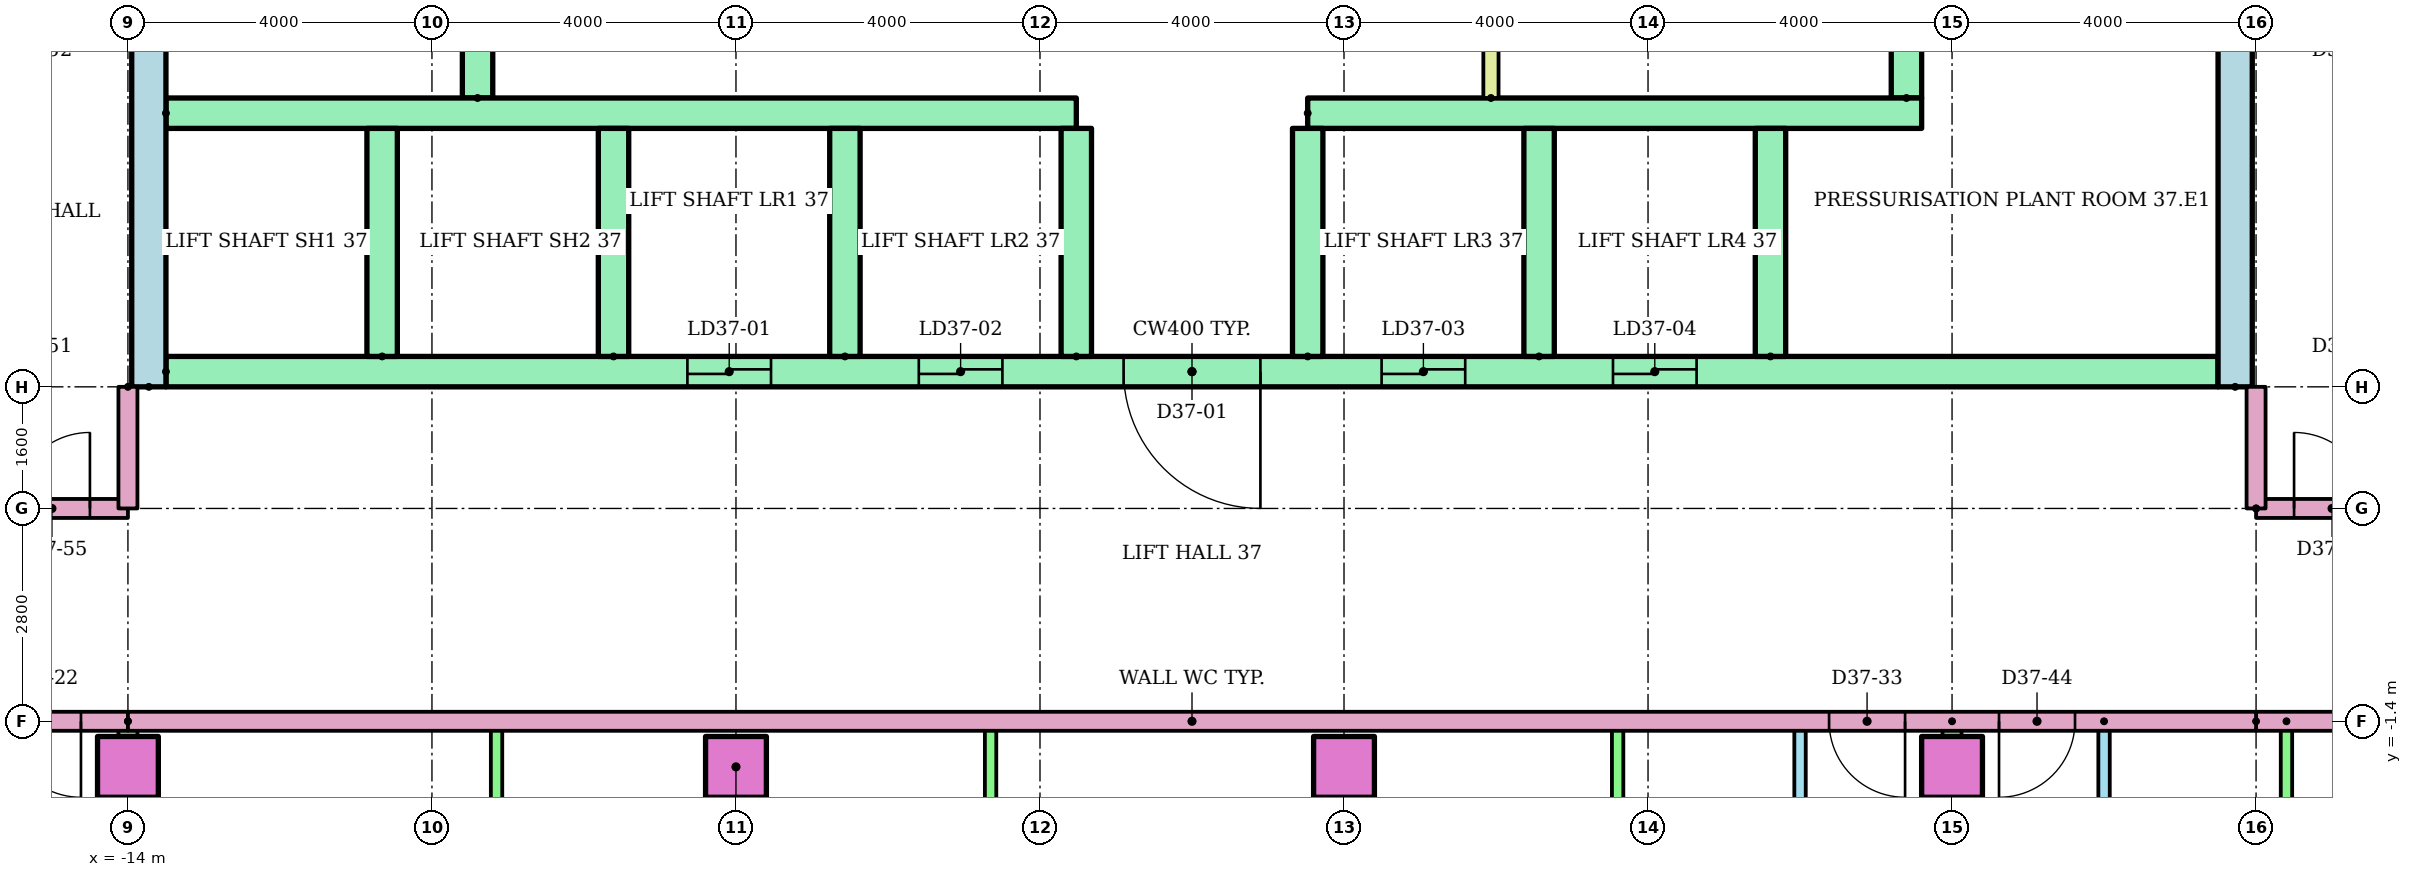
"""IFC4 building model, lengths in metres.
Left out: names, types, materials, properties, quantities, classifications, styles, units other than length and angle.
Written with IfcOpenShell. Run it as: python <this file> out.ifc"""

import sys

from ifc_helpers import new_model, si_unit, direction, frame, frame_2d, origin, origin_2d, place, context, subcontext, project, spatial, rectangle, extrude, element, fill, save


model = new_model("IFC4")
c1 = context("Model", 3, precision=1e-05, world=origin(), true_north=direction((0.0, 1.0)))
c2 = subcontext(c1, "Body", "Model", "MODEL_VIEW")
j1 = project(units=[si_unit("LENGTHUNIT", "METRE"), si_unit("PLANEANGLEUNIT", "RADIAN")], contexts=[c1])
p1 = place(None, origin())
s1 = spatial("IfcSite", under=j1, at=p1, CompositionType="ELEMENT")
p2 = place(p1, origin())
s2 = spatial("IfcBuilding", under=s1, at=p2, CompositionType="ELEMENT")
p3 = place(p2, frame((0.0, 0.0, 142.2)))
s3 = spatial("IfcBuildingStorey", under=s2, at=p3, CompositionType="ELEMENT", Elevation=142.2)
for number, where in (
    (1, (-14.0, -2.0, 0.0)),
    (2, (-6.0, -2.0, 0.0)),
    (3, (2.0, -2.0, 0.0)),
    (4, (10.0, -2.0, 0.0)),
):
    element("IfcColumn", number, at=place(p3, frame(where)), inside=s3, PredefinedType="COLUMN", context=c2, shape_type="SweptSolid", body=[
        extrude(rectangle(XDim=0.8, YDim=0.8, at=origin_2d()), origin(), (0.0, 0.0, 1.0), 3.2),
    ])
for number, where, z_axis, x_axis in (
    (5, (-13.725, 3.0, 0.0), (0.0, 0.0, 1.0), (0.0, 1.0, 0.0)),
    (6, (13.725, 3.0, 0.0), (0.0, 0.0, 1.0), (0.0, 1.0, 0.0)),
):
    element("IfcWall", number, at=place(p3, frame(where, z_axis=z_axis, x_axis=x_axis)), inside=s3, PredefinedType="SHEAR", context=c2, shape_type="SweptSolid", body=[
        extrude(rectangle(XDim=17.0, YDim=0.45, at=frame_2d((8.5, 0.0))), origin(), (0.0, 0.0, 1.0), 2.92),
    ])
p4 = place(p3, frame((-9.4, 6.8, 0.0), z_axis=(0.0, 0.0, 1.0), x_axis=(0.0, 1.0, 0.0)))
e7 = element("IfcWall", 7, at=p4, inside=s3, PredefinedType="SHEAR", context=c2, shape_type="SweptSolid", body=[
    extrude(rectangle(XDim=12.7, YDim=0.4, at=frame_2d((6.35, 0.0))), origin(), (0.0, 0.0, 1.0), 2.92),
])
p5 = place(p4, frame((1.15, 0.0, 0.0)))
e8 = element("IfcOpeningElement", 8, at=p5, cuts=e7, PredefinedType="OPENING", context=c2, shape_type="SweptSolid", body=[
    extrude(rectangle(XDim=1.0, YDim=2.1, at=frame_2d((0.5, 1.05))), frame((0.0, 0.21, 0.0), z_axis=(0.0, -1.0, 0.0), x_axis=(1.0, 0.0, 0.0)), (0.0, 0.0, 1.0), 0.42),
])
p6 = place(p4, frame((7.925, 0.0, 0.0)))
e9 = element("IfcOpeningElement", 9, at=p6, cuts=e7, PredefinedType="OPENING", context=c2, shape_type="SweptSolid", body=[
    extrude(rectangle(XDim=1.0, YDim=2.1, at=frame_2d((0.5, 1.05))), frame((0.0, 0.21, 0.0), z_axis=(0.0, -1.0, 0.0), x_axis=(1.0, 0.0, 0.0)), (0.0, 0.0, 1.0), 0.42),
])
p7 = place(p3, frame((9.4, 6.8, 0.0), z_axis=(0.0, 0.0, 1.0), x_axis=(0.0, 1.0, 0.0)))
e10 = element("IfcWall", 10, at=p7, inside=s3, PredefinedType="SHEAR", context=c2, shape_type="SweptSolid", body=[
    extrude(rectangle(XDim=12.7, YDim=0.4, at=frame_2d((6.35, 0.0))), origin(), (0.0, 0.0, 1.0), 2.92),
])
p8 = place(p7, frame((1.15, 0.0, 0.0)))
e11 = element("IfcOpeningElement", 11, at=p8, cuts=e10, PredefinedType="OPENING", context=c2, shape_type="SweptSolid", body=[
    extrude(rectangle(XDim=1.0, YDim=2.1, at=frame_2d((0.5, 1.05))), frame((0.0, 0.21, 0.0), z_axis=(0.0, -1.0, 0.0), x_axis=(1.0, 0.0, 0.0)), (0.0, 0.0, 1.0), 0.42),
])
p9 = place(p7, frame((7.925, 0.0, 0.0)))
e12 = element("IfcOpeningElement", 12, at=p9, cuts=e10, PredefinedType="OPENING", context=c2, shape_type="SweptSolid", body=[
    extrude(rectangle(XDim=1.0, YDim=2.1, at=frame_2d((0.5, 1.05))), frame((0.0, 0.21, 0.0), z_axis=(0.0, -1.0, 0.0), x_axis=(1.0, 0.0, 0.0)), (0.0, 0.0, 1.0), 0.42),
])
p10 = place(p3, frame((-13.5, 3.2, 0.0)))
e13 = element("IfcWall", 13, at=p10, inside=s3, PredefinedType="SHEAR", context=c2, shape_type="SweptSolid", body=[
    extrude(rectangle(XDim=27.0, YDim=0.4, at=frame_2d((13.5, 0.0))), origin(), (0.0, 0.0, 1.0), 2.92),
])
p11 = place(p10, frame((6.861, 0.0, 0.0)))
e14 = element("IfcOpeningElement", 14, at=p11, cuts=e13, PredefinedType="OPENING", context=c2, shape_type="SweptSolid", body=[
    extrude(rectangle(XDim=1.1, YDim=2.1, at=frame_2d((0.55, 1.05))), frame((0.0, 0.21, 0.0), z_axis=(0.0, -1.0, 0.0), x_axis=(1.0, 0.0, 0.0)), (0.0, 0.0, 1.0), 0.42),
])
p12 = place(p10, frame((9.906, 0.0, 0.0)))
e15 = element("IfcOpeningElement", 15, at=p12, cuts=e13, PredefinedType="OPENING", context=c2, shape_type="SweptSolid", body=[
    extrude(rectangle(XDim=1.1, YDim=2.1, at=frame_2d((0.55, 1.05))), frame((0.0, 0.21, 0.0), z_axis=(0.0, -1.0, 0.0), x_axis=(1.0, 0.0, 0.0)), (0.0, 0.0, 1.0), 0.42),
])
p13 = place(p10, frame((15.994, 0.0, 0.0)))
e16 = element("IfcOpeningElement", 16, at=p13, cuts=e13, PredefinedType="OPENING", context=c2, shape_type="SweptSolid", body=[
    extrude(rectangle(XDim=1.1, YDim=2.1, at=frame_2d((0.55, 1.05))), frame((0.0, 0.21, 0.0), z_axis=(0.0, -1.0, 0.0), x_axis=(1.0, 0.0, 0.0)), (0.0, 0.0, 1.0), 0.42),
])
p14 = place(p10, frame((19.039, 0.0, 0.0)))
e17 = element("IfcOpeningElement", 17, at=p14, cuts=e13, PredefinedType="OPENING", context=c2, shape_type="SweptSolid", body=[
    extrude(rectangle(XDim=1.1, YDim=2.1, at=frame_2d((0.55, 1.05))), frame((0.0, 0.21, 0.0), z_axis=(0.0, -1.0, 0.0), x_axis=(1.0, 0.0, 0.0)), (0.0, 0.0, 1.0), 0.42),
])
p15 = place(p10, frame((12.6, 0.0, 0.0)))
e18 = element("IfcOpeningElement", 18, at=p15, cuts=e13, PredefinedType="OPENING", context=c2, shape_type="SweptSolid", body=[
    extrude(rectangle(XDim=1.8, YDim=2.1, at=frame_2d((0.9, 1.05))), frame((0.0, 0.21, 0.0), z_axis=(0.0, -1.0, 0.0), x_axis=(1.0, 0.0, 0.0)), (0.0, 0.0, 1.0), 0.42),
])
p16 = place(p3, frame((-13.5, 6.6, 0.0)))
e19 = element("IfcWall", 19, at=p16, inside=s3, PredefinedType="SHEAR", context=c2, shape_type="SweptSolid", body=[
    extrude(rectangle(XDim=11.978, YDim=0.4, at=frame_2d((5.989, 0.0))), origin(), (0.0, 0.0, 1.0), 2.92),
])
p17 = place(p3, frame((1.522, 6.6, 0.0)))
e20 = element("IfcWall", 20, at=p17, inside=s3, PredefinedType="SHEAR", context=c2, shape_type="SweptSolid", body=[
    extrude(rectangle(XDim=8.078, YDim=0.4, at=frame_2d((4.039, 0.0))), origin(), (0.0, 0.0, 1.0), 2.92),
])
for number, where, z_axis, x_axis in (
    (21, (-10.656, 3.4, 0.0), (0.0, 0.0, 1.0), (0.0, 1.0, 0.0)),
    (22, (-7.611, 3.4, 0.0), (0.0, 0.0, 1.0), (0.0, 1.0, 0.0)),
    (23, (-4.567, 3.4, 0.0), (0.0, 0.0, 1.0), (0.0, 1.0, 0.0)),
    (24, (-1.522, 3.4, 0.0), (0.0, 0.0, 1.0), (0.0, 1.0, 0.0)),
    (25, (1.522, 3.4, 0.0), (0.0, 0.0, 1.0), (0.0, 1.0, 0.0)),
    (26, (4.567, 3.4, 0.0), (0.0, 0.0, 1.0), (0.0, 1.0, 0.0)),
    (27, (7.611, 3.4, 0.0), (0.0, 0.0, 1.0), (0.0, 1.0, 0.0)),
):
    element("IfcWall", number, at=place(p3, frame(where, z_axis=z_axis, x_axis=x_axis)), inside=s3, PredefinedType="SHEAR", context=c2, shape_type="SweptSolid", body=[
        extrude(rectangle(XDim=3.0, YDim=0.4, at=frame_2d((1.5, 0.0))), origin(), (0.0, 0.0, 1.0), 2.92),
    ])
p18 = place(p3, frame((3.933, 6.8, 0.0), z_axis=(0.0, 0.0, 1.0), x_axis=(0.0, 1.0, 0.0)))
e28 = element("IfcWall", 28, at=p18, inside=s3, PredefinedType="PARTITIONING", context=c2, shape_type="SweptSolid", body=[
    extrude(rectangle(XDim=3.3, YDim=0.2, at=frame_2d((1.65, 0.0))), origin(), (0.0, 0.0, 1.0), 2.92),
])
p19 = place(p18, frame((1.1, 0.0, 0.0)))
e29 = element("IfcOpeningElement", 29, at=p19, cuts=e28, PredefinedType="OPENING", context=c2, shape_type="SweptSolid", body=[
    extrude(rectangle(XDim=1.1, YDim=2.1, at=frame_2d((0.55, 1.05))), frame((0.0, 0.11, 0.0), z_axis=(0.0, -1.0, 0.0), x_axis=(1.0, 0.0, 0.0)), (0.0, 0.0, 1.0), 0.22),
])
p20 = place(p3, frame((8.0, -6.8, 0.0), z_axis=(0.0, 0.0, 1.0), x_axis=(0.0, 1.0, 0.0)))
e30 = element("IfcWall", 30, at=p20, inside=s3, PredefinedType="PARTITIONING", context=c2, shape_type="SweptSolid", body=[
    extrude(rectangle(XDim=5.4, YDim=0.15, at=frame_2d((2.7, 0.0))), origin(), (0.0, 0.0, 1.0), 2.4),
])
p21 = place(p20, frame((3.45, 0.0, 0.0)))
e31 = element("IfcOpeningElement", 31, at=p21, cuts=e30, PredefinedType="OPENING", context=c2, shape_type="SweptSolid", body=[
    extrude(rectangle(XDim=0.9, YDim=2.1, at=frame_2d((0.45, 1.05))), frame((0.0, 0.085, 0.0), z_axis=(0.0, -1.0, 0.0), x_axis=(1.0, 0.0, 0.0)), (0.0, 0.0, 1.0), 0.17),
])
p22 = place(p20, frame((0.8, 0.0, 0.0)))
e32 = element("IfcOpeningElement", 32, at=p22, cuts=e30, PredefinedType="OPENING", context=c2, shape_type="SweptSolid", body=[
    extrude(rectangle(XDim=0.8, YDim=2.1, at=frame_2d((0.4, 1.05))), frame((0.0, 0.085, 0.0), z_axis=(0.0, -1.0, 0.0), x_axis=(1.0, 0.0, 0.0)), (0.0, 0.0, 1.0), 0.17),
])
for number, where, z_axis, x_axis in (
    (33, (5.6, -6.8, 0.0), (0.0, 0.0, 1.0), (0.0, 1.0, 0.0)),
    (34, (-2.65, -6.8, 0.0), (0.0, 0.0, 1.0), (0.0, 1.0, 0.0)),
    (35, (-9.15, -6.8, 0.0), (0.0, 0.0, 1.0), (0.0, 1.0, 0.0)),
):
    element("IfcWall", number, at=place(p3, frame(where, z_axis=z_axis, x_axis=x_axis)), inside=s3, PredefinedType="PARTITIONING", context=c2, shape_type="SweptSolid", body=[
        extrude(rectangle(XDim=5.4, YDim=0.15, at=frame_2d((2.7, 0.0))), origin(), (0.0, 0.0, 1.0), 2.4),
    ])
p23 = place(p3, frame((-14.0, -1.4, 0.0), z_axis=(0.0, 0.0, 1.0), x_axis=(0.0, -1.0, 0.0)))
e36 = element("IfcWall", 36, at=p23, inside=s3, PredefinedType="PARTITIONING", context=c2, shape_type="SweptSolid", body=[
    extrude(rectangle(XDim=14.91, YDim=0.25, at=frame_2d((7.455, 0.0))), origin(), (0.0, 0.0, 1.0), 2.4),
])
p24 = place(p3, frame((12.0, -1.4, 0.0), z_axis=(0.0, 0.0, 1.0), x_axis=(0.0, -1.0, 0.0)))
e37 = element("IfcWall", 37, at=p24, inside=s3, PredefinedType="PARTITIONING", context=c2, shape_type="SweptSolid", body=[
    extrude(rectangle(XDim=5.4, YDim=0.15, at=frame_2d((2.7, 0.0))), origin(), (0.0, 0.0, 1.0), 2.4),
])
p25 = place(p24, frame((1.05, 0.0, 0.0)))
e38 = element("IfcOpeningElement", 38, at=p25, cuts=e37, PredefinedType="OPENING", context=c2, shape_type="SweptSolid", body=[
    extrude(rectangle(XDim=0.9, YDim=2.1, at=frame_2d((0.45, 1.05))), frame((0.0, 0.085, 0.0), z_axis=(0.0, -1.0, 0.0), x_axis=(1.0, 0.0, 0.0)), (0.0, 0.0, 1.0), 0.17),
])
p26 = place(p24, frame((3.8, 0.0, 0.0)))
e39 = element("IfcOpeningElement", 39, at=p26, cuts=e37, PredefinedType="OPENING", context=c2, shape_type="SweptSolid", body=[
    extrude(rectangle(XDim=0.8, YDim=2.1, at=frame_2d((0.4, 1.05))), frame((0.0, 0.085, 0.0), z_axis=(0.0, -1.0, 0.0), x_axis=(1.0, 0.0, 0.0)), (0.0, 0.0, 1.0), 0.17),
])
p27 = place(p3, frame((14.4, -1.4, 0.0), z_axis=(0.0, 0.0, 1.0), x_axis=(0.0, -1.0, 0.0)))
e40 = element("IfcWall", 40, at=p27, inside=s3, PredefinedType="PARTITIONING", context=c2, shape_type="SweptSolid", body=[
    extrude(rectangle(XDim=5.4, YDim=0.15, at=frame_2d((2.7, 0.0))), origin(), (0.0, 0.0, 1.0), 2.4),
])
p28 = place(p3, frame((10.0, -1.4, 0.0), z_axis=(0.0, 0.0, 1.0), x_axis=(0.0, -1.0, 0.0)))
e41 = element("IfcWall", 41, at=p28, inside=s3, PredefinedType="PARTITIONING", context=c2, shape_type="SweptSolid", body=[
    extrude(rectangle(XDim=14.91, YDim=0.25, at=frame_2d((7.455, 0.0))), origin(), (0.0, 0.0, 1.0), 2.4),
])
p29 = place(p3, frame((-14.0, -1.4, 0.0), z_axis=(0.0, 0.0, 1.0), x_axis=(-1.0, 0.0, 0.0)))
e42 = element("IfcWall", 42, at=p29, inside=s3, PredefinedType="PARTITIONING", context=c2, shape_type="SweptSolid", body=[
    extrude(rectangle(XDim=15.0, YDim=0.25, at=frame_2d((7.5, 0.0))), origin(), (0.0, 0.0, 1.0), 2.4),
])
p30 = place(p29, frame((0.618, 0.0, 0.0)))
e43 = element("IfcOpeningElement", 43, at=p30, cuts=e42, PredefinedType="OPENING", context=c2, shape_type="SweptSolid", body=[
    extrude(rectangle(XDim=1.0, YDim=2.1, at=frame_2d((0.5, 1.05))), frame((0.0, 0.135, 0.0), z_axis=(0.0, -1.0, 0.0), x_axis=(1.0, 0.0, 0.0)), (0.0, 0.0, 1.0), 0.27),
])
p31 = place(p3, frame((29.0, -1.4, 0.0), z_axis=(0.0, 0.0, 1.0), x_axis=(-1.0, 0.0, 0.0)))
e44 = element("IfcWall", 44, at=p31, inside=s3, PredefinedType="PARTITIONING", context=c2, shape_type="SweptSolid", body=[
    extrude(rectangle(XDim=15.0, YDim=0.25, at=frame_2d((7.5, 0.0))), origin(), (0.0, 0.0, 1.0), 2.4),
])
p32 = place(p3, frame((-29.0, 1.4, 0.0)))
e45 = element("IfcWall", 45, at=p32, inside=s3, PredefinedType="PARTITIONING", context=c2, shape_type="SweptSolid", body=[
    extrude(rectangle(XDim=15.0, YDim=0.25, at=frame_2d((7.5, 0.0))), origin(), (0.0, 0.0, 1.0), 2.4),
])
p33 = place(p32, frame((5.382, 0.0, 0.0)))
e46 = element("IfcOpeningElement", 46, at=p33, cuts=e45, PredefinedType="OPENING", context=c2, shape_type="SweptSolid", body=[
    extrude(rectangle(XDim=1.0, YDim=2.1, at=frame_2d((0.5, 1.05))), frame((0.0, 0.135, 0.0), z_axis=(0.0, -1.0, 0.0), x_axis=(1.0, 0.0, 0.0)), (0.0, 0.0, 1.0), 0.27),
])
p34 = place(p32, frame((13.5, 0.0, 0.0)))
e47 = element("IfcOpeningElement", 47, at=p34, cuts=e45, PredefinedType="OPENING", context=c2, shape_type="SweptSolid", body=[
    extrude(rectangle(XDim=1.0, YDim=2.1, at=frame_2d((0.5, 1.05))), frame((0.0, 0.135, 0.0), z_axis=(0.0, -1.0, 0.0), x_axis=(1.0, 0.0, 0.0)), (0.0, 0.0, 1.0), 0.27),
])
p35 = place(p3, frame((14.0, 1.4, 0.0)))
e48 = element("IfcWall", 48, at=p35, inside=s3, PredefinedType="PARTITIONING", context=c2, shape_type="SweptSolid", body=[
    extrude(rectangle(XDim=15.0, YDim=0.25, at=frame_2d((7.5, 0.0))), origin(), (0.0, 0.0, 1.0), 2.4),
])
p36 = place(p35, frame((0.5, 0.0, 0.0)))
e49 = element("IfcOpeningElement", 49, at=p36, cuts=e48, PredefinedType="OPENING", context=c2, shape_type="SweptSolid", body=[
    extrude(rectangle(XDim=1.0, YDim=2.1, at=frame_2d((0.5, 1.05))), frame((0.0, 0.135, 0.0), z_axis=(0.0, -1.0, 0.0), x_axis=(1.0, 0.0, 0.0)), (0.0, 0.0, 1.0), 0.27),
])
p37 = place(p3, frame((14.0, -1.4, 0.0), z_axis=(0.0, 0.0, 1.0), x_axis=(-1.0, 0.0, 0.0)))
e50 = element("IfcWall", 50, at=p37, inside=s3, PredefinedType="PARTITIONING", context=c2, shape_type="SweptSolid", body=[
    extrude(rectangle(XDim=28.0, YDim=0.25, at=frame_2d((14.0, 0.0))), origin(), (0.0, 0.0, 1.0), 2.4),
])
p38 = place(p37, frame((4.618, 0.0, 0.0)))
e51 = element("IfcOpeningElement", 51, at=p38, cuts=e50, PredefinedType="OPENING", context=c2, shape_type="SweptSolid", body=[
    extrude(rectangle(XDim=1.0, YDim=2.1, at=frame_2d((0.5, 1.05))), frame((0.0, 0.135, 0.0), z_axis=(0.0, -1.0, 0.0), x_axis=(1.0, 0.0, 0.0)), (0.0, 0.0, 1.0), 0.27),
])
p39 = place(p37, frame((2.382, 0.0, 0.0)))
e52 = element("IfcOpeningElement", 52, at=p39, cuts=e50, PredefinedType="OPENING", context=c2, shape_type="SweptSolid", body=[
    extrude(rectangle(XDim=1.0, YDim=2.1, at=frame_2d((0.5, 1.05))), frame((0.0, 0.135, 0.0), z_axis=(0.0, -1.0, 0.0), x_axis=(1.0, 0.0, 0.0)), (0.0, 0.0, 1.0), 0.27),
])
for number, where, z_axis, x_axis in (
    (53, (-14.0, 3.0, 0.0), (0.0, 0.0, 1.0), (0.0, -1.0, 0.0)),
    (54, (14.0, 1.4, 0.0), (0.0, 0.0, 1.0), (0.0, 1.0, 0.0)),
):
    element("IfcWall", number, at=place(p3, frame(where, z_axis=z_axis, x_axis=x_axis)), inside=s3, PredefinedType="PARTITIONING", context=c2, shape_type="SweptSolid", body=[
        extrude(rectangle(XDim=1.6, YDim=0.25, at=frame_2d((0.8, 0.0))), origin(), (0.0, 0.0, 1.0), 2.4),
    ])
p40 = place(p11, origin())
e55 = element("IfcDoor", 55, at=p40, inside=s3, OperationType="SLIDING_TO_LEFT", PredefinedType="DOOR", context=c2, shape_type="SweptSolid", body=[
    extrude(rectangle(XDim=1.1, YDim=2.1, at=frame_2d((0.55, 1.05))), frame((0.0, 0.025, 0.0), z_axis=(0.0, -1.0, 0.0), x_axis=(1.0, 0.0, 0.0)), (0.0, 0.0, 1.0), 0.05),
])
fill(e14, e55)
p41 = place(p12, origin())
e56 = element("IfcDoor", 56, at=p41, inside=s3, OperationType="SLIDING_TO_LEFT", PredefinedType="DOOR", context=c2, shape_type="SweptSolid", body=[
    extrude(rectangle(XDim=1.1, YDim=2.1, at=frame_2d((0.55, 1.05))), frame((0.0, 0.025, 0.0), z_axis=(0.0, -1.0, 0.0), x_axis=(1.0, 0.0, 0.0)), (0.0, 0.0, 1.0), 0.05),
])
fill(e15, e56)
p42 = place(p13, origin())
e57 = element("IfcDoor", 57, at=p42, inside=s3, OperationType="SLIDING_TO_LEFT", PredefinedType="DOOR", context=c2, shape_type="SweptSolid", body=[
    extrude(rectangle(XDim=1.1, YDim=2.1, at=frame_2d((0.55, 1.05))), frame((0.0, 0.025, 0.0), z_axis=(0.0, -1.0, 0.0), x_axis=(1.0, 0.0, 0.0)), (0.0, 0.0, 1.0), 0.05),
])
fill(e16, e57)
p43 = place(p14, origin())
e58 = element("IfcDoor", 58, at=p43, inside=s3, OperationType="SLIDING_TO_LEFT", PredefinedType="DOOR", context=c2, shape_type="SweptSolid", body=[
    extrude(rectangle(XDim=1.1, YDim=2.1, at=frame_2d((0.55, 1.05))), frame((0.0, 0.025, 0.0), z_axis=(0.0, -1.0, 0.0), x_axis=(1.0, 0.0, 0.0)), (0.0, 0.0, 1.0), 0.05),
])
fill(e17, e58)
p44 = place(p15, frame((1.8, 0.0, 0.0), z_axis=(0.0, 0.0, 1.0), x_axis=(-1.0, 0.0, 0.0)))
e59 = element("IfcDoor", 59, at=p44, inside=s3, OperationType="DOUBLE_DOOR_SINGLE_SWING", PredefinedType="DOOR", context=c2, shape_type="SweptSolid", body=[
    extrude(rectangle(XDim=1.8, YDim=2.1, at=frame_2d((0.9, 1.05))), frame((0.0, 0.025, 0.0), z_axis=(0.0, -1.0, 0.0), x_axis=(1.0, 0.0, 0.0)), (0.0, 0.0, 1.0), 0.05),
])
fill(e18, e59)
p45 = place(p30, origin())
e60 = element("IfcDoor", 60, at=p45, inside=s3, OperationType="SINGLE_SWING_LEFT", PredefinedType="DOOR", context=c2, shape_type="SweptSolid", body=[
    extrude(rectangle(XDim=1.0, YDim=2.1, at=frame_2d((0.5, 1.05))), frame((0.0, 0.025, 0.0), z_axis=(0.0, -1.0, 0.0), x_axis=(1.0, 0.0, 0.0)), (0.0, 0.0, 1.0), 0.05),
])
fill(e43, e60)
p46 = place(p38, origin())
e61 = element("IfcDoor", 61, at=p46, inside=s3, OperationType="SINGLE_SWING_LEFT", PredefinedType="DOOR", context=c2, shape_type="SweptSolid", body=[
    extrude(rectangle(XDim=1.0, YDim=2.1, at=frame_2d((0.5, 1.05))), frame((0.0, 0.025, 0.0), z_axis=(0.0, -1.0, 0.0), x_axis=(1.0, 0.0, 0.0)), (0.0, 0.0, 1.0), 0.05),
])
fill(e51, e61)
p47 = place(p39, origin())
e62 = element("IfcDoor", 62, at=p47, inside=s3, OperationType="SINGLE_SWING_RIGHT", PredefinedType="DOOR", context=c2, shape_type="SweptSolid", body=[
    extrude(rectangle(XDim=1.0, YDim=2.1, at=frame_2d((0.5, 1.05))), frame((0.0, 0.025, 0.0), z_axis=(0.0, -1.0, 0.0), x_axis=(1.0, 0.0, 0.0)), (0.0, 0.0, 1.0), 0.05),
])
fill(e52, e62)
p48 = place(p34, origin())
e63 = element("IfcDoor", 63, at=p48, inside=s3, OperationType="SINGLE_SWING_RIGHT", PredefinedType="DOOR", context=c2, shape_type="SweptSolid", body=[
    extrude(rectangle(XDim=1.0, YDim=2.1, at=frame_2d((0.5, 1.05))), frame((0.0, 0.025, 0.0), z_axis=(0.0, -1.0, 0.0), x_axis=(1.0, 0.0, 0.0)), (0.0, 0.0, 1.0), 0.05),
])
fill(e47, e63)
p49 = place(p36, origin())
e64 = element("IfcDoor", 64, at=p49, inside=s3, OperationType="SINGLE_SWING_LEFT", PredefinedType="DOOR", context=c2, shape_type="SweptSolid", body=[
    extrude(rectangle(XDim=1.0, YDim=2.1, at=frame_2d((0.5, 1.05))), frame((0.0, 0.025, 0.0), z_axis=(0.0, -1.0, 0.0), x_axis=(1.0, 0.0, 0.0)), (0.0, 0.0, 1.0), 0.05),
])
fill(e49, e64)
save(model, sys.argv[1])
